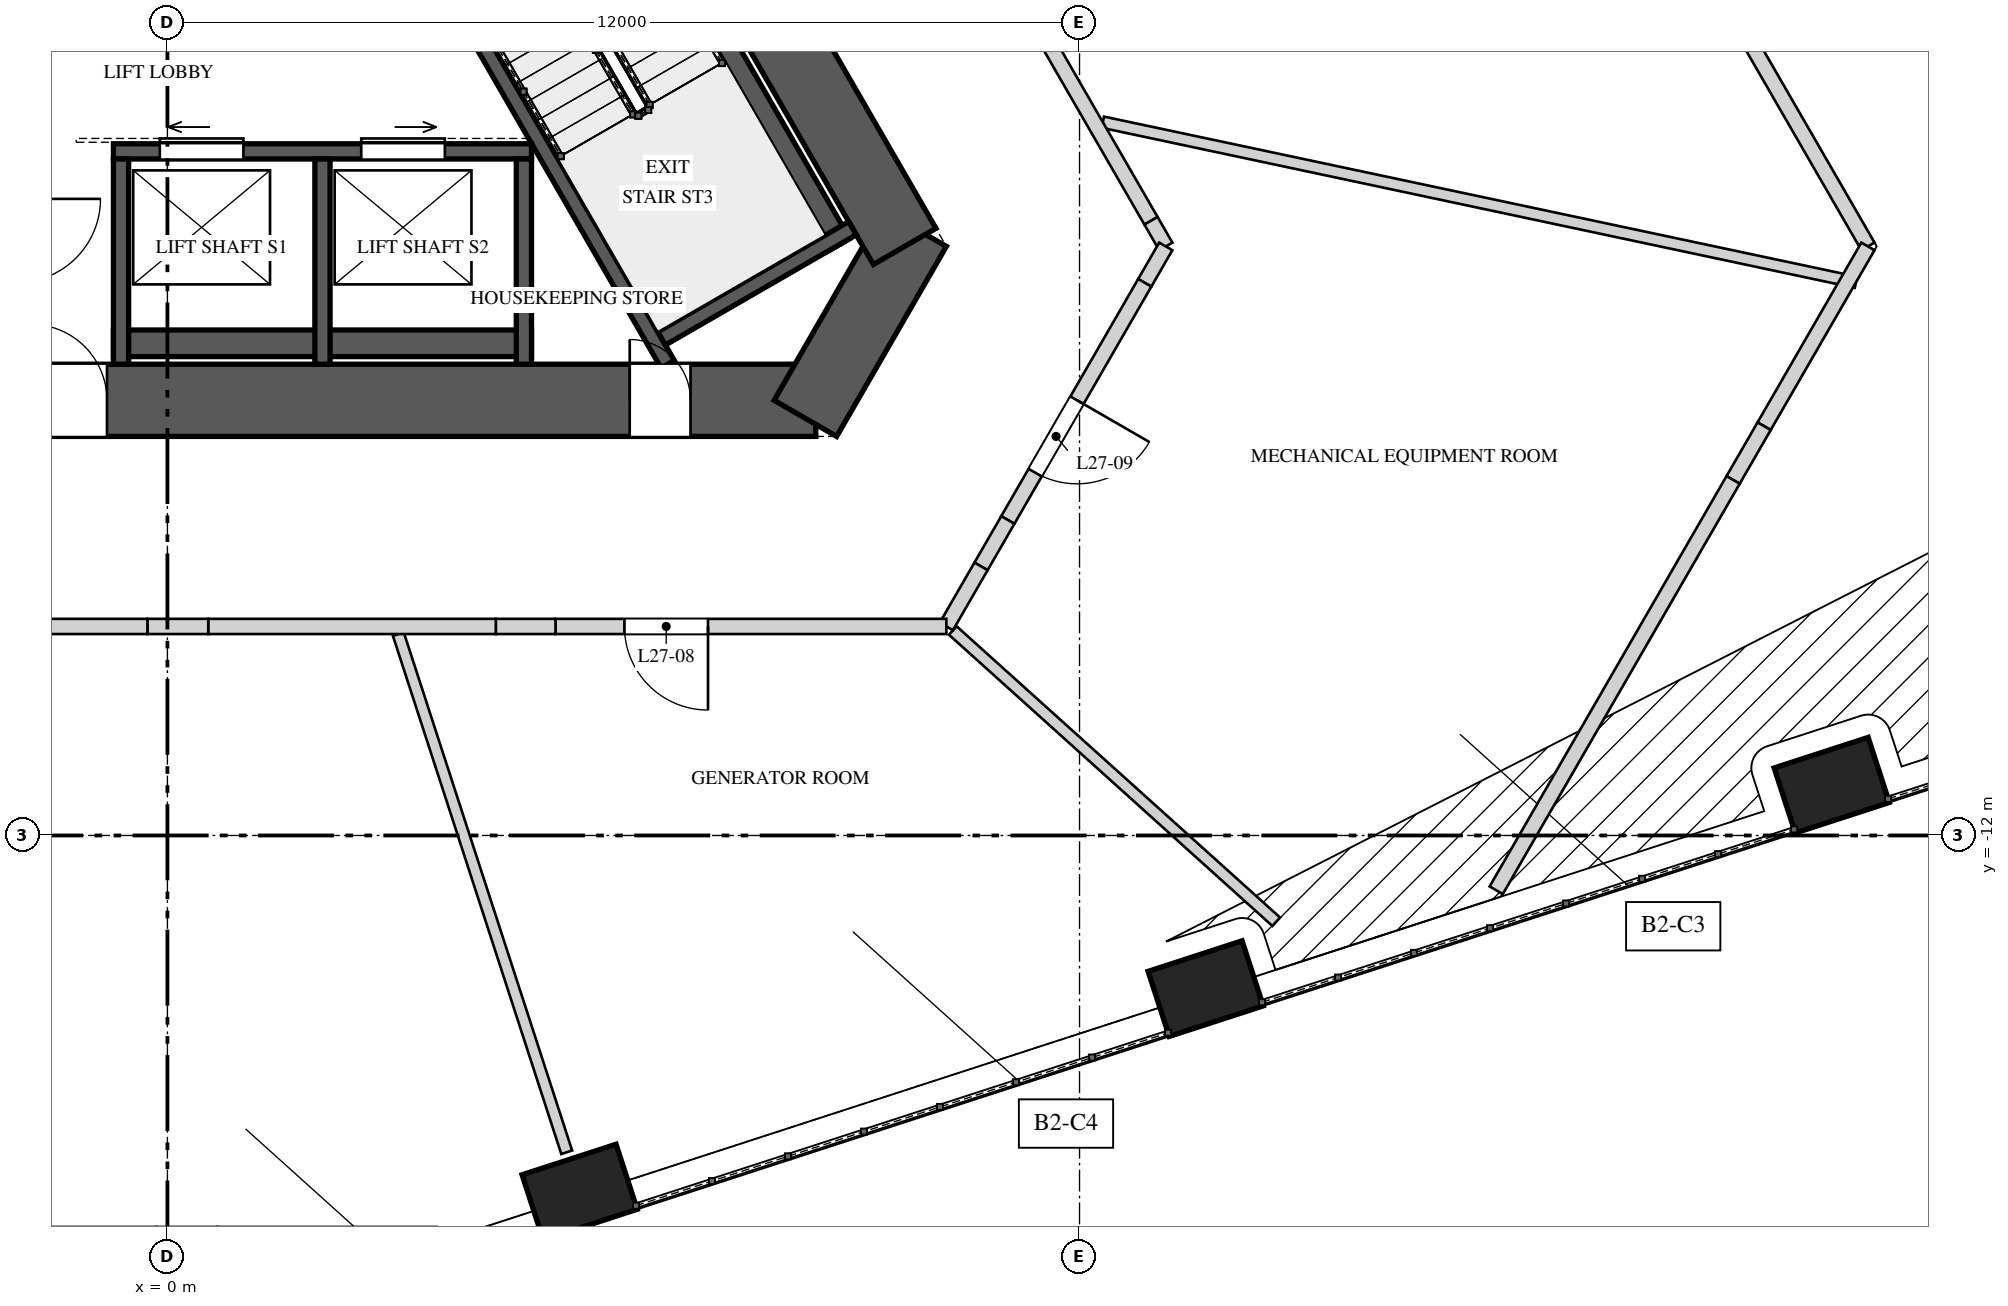
"""IFC4 building model, lengths in metres.
Left out: names, types, materials, properties, quantities, classifications, styles, units other than length and angle.
Written with IfcOpenShell. Run it as: python <this file> out.ifc"""

import sys

from ifc_helpers import new_model, si_unit, direction, frame, frame_2d, origin, origin_2d, place, context, subcontext, project, spatial, rectangle, extrude, element, fill, save


model = new_model("IFC4")
c1 = context("Model", 3, precision=1e-05, world=origin(), true_north=direction((0.0, 1.0)))
c2 = subcontext(c1, "Body", "Model", "MODEL_VIEW")
j1 = project(units=[si_unit("LENGTHUNIT", "METRE"), si_unit("PLANEANGLEUNIT", "RADIAN")], contexts=[c1])
p1 = place(None, origin())
s1 = spatial("IfcSite", under=j1, at=p1, CompositionType="ELEMENT")
p2 = place(p1, origin())
s2 = spatial("IfcBuilding", under=s1, at=p2, CompositionType="ELEMENT")
p3 = place(p2, frame((0.0, 0.0, 120.4)))
s3 = spatial("IfcBuildingStorey", under=s2, at=p3, CompositionType="ELEMENT", Elevation=120.4)
p4 = place(p3, frame((-1.169, 10.525, 0.0), z_axis=(0.0, 0.0, 1.0), x_axis=(-0.499999102847, -0.866025921755, 0.0)))
e1 = element("IfcWall", 1, at=p4, inside=s3, PredefinedType="SHEAR", context=c2, shape_type="SweptSolid", body=[
    extrude(rectangle(XDim=17.061, YDim=0.95, at=frame_2d((8.53, 0.0))), origin(), (0.0, 0.0, 1.0), 5.2),
])
p5 = place(p4, frame((6.735, 0.0, 0.0)))
e2 = element("IfcOpeningElement", 2, at=p5, cuts=e1, PredefinedType="OPENING", context=c2, shape_type="SweptSolid", body=[
    extrude(rectangle(XDim=1.0, YDim=2.4, at=frame_2d((0.5, 1.2))), frame((0.0, 0.485, 0.0), z_axis=(0.0, -1.0, 0.0), x_axis=(1.0, 0.0, 0.0)), (0.0, 0.0, 1.0), 0.97),
])
p6 = place(p3, frame((-8.531, -6.275, 0.0), z_axis=(0.0, 0.0, 1.0), x_axis=(1.0, 0.0, 0.0)))
e3 = element("IfcWall", 3, at=p6, inside=s3, PredefinedType="SHEAR", context=c2, shape_type="SweptSolid", body=[
    extrude(rectangle(XDim=17.061, YDim=0.95, at=frame_2d((8.531, 0.0))), origin(), (0.0, 0.0, 1.0), 5.2),
])
p7 = place(p6, frame((6.735, 0.0, 0.0)))
e4 = element("IfcOpeningElement", 4, at=p7, cuts=e3, PredefinedType="OPENING", context=c2, shape_type="SweptSolid", body=[
    extrude(rectangle(XDim=1.0, YDim=2.4, at=frame_2d((0.5, 1.2))), frame((0.0, 0.485, 0.0), z_axis=(0.0, -1.0, 0.0), x_axis=(1.0, 0.0, 0.0)), (0.0, 0.0, 1.0), 0.97),
])
p8 = place(p6, frame((14.613, 0.0, 0.0)))
e5 = element("IfcOpeningElement", 5, at=p8, cuts=e3, PredefinedType="OPENING", context=c2, shape_type="SweptSolid", body=[
    extrude(rectangle(XDim=0.8, YDim=2.1, at=frame_2d((0.4, 1.05))), frame((0.0, 0.485, 0.0), z_axis=(0.0, -1.0, 0.0), x_axis=(1.0, 0.0, 0.0)), (0.0, 0.0, 1.0), 0.97),
])
p9 = place(p3, frame((8.393, -6.512, 0.0), z_axis=(0.0, 0.0, 1.0), x_axis=(0.499995765644, 0.866027848477, 0.0)))
e6 = element("IfcWall", 6, at=p9, inside=s3, PredefinedType="SHEAR", context=c2, shape_type="SweptSolid", body=[
    extrude(rectangle(XDim=2.887, YDim=0.95, at=frame_2d((1.443, 0.0))), origin(), (0.0, 0.0, 1.0), 5.2),
])
p10 = place(p3, frame((9.699, -4.25, 0.0), z_axis=(0.0, 0.0, 1.0), x_axis=(-0.499999102847, 0.866025921755, 0.0)))
e7 = element("IfcWall", 7, at=p10, inside=s3, PredefinedType="SHEAR", context=c2, shape_type="SweptSolid", body=[
    extrude(rectangle(XDim=17.061, YDim=0.95, at=frame_2d((8.53, 0.0))), origin(), (0.0, 0.0, 1.0), 5.2),
])
p11 = place(p10, frame((6.805, 0.0, 0.0)))
e8 = element("IfcOpeningElement", 8, at=p11, cuts=e7, PredefinedType="OPENING", context=c2, shape_type="SweptSolid", body=[
    extrude(rectangle(XDim=1.0, YDim=2.4, at=frame_2d((0.5, 1.2))), frame((0.0, 0.485, 0.0), z_axis=(0.0, -1.0, 0.0), x_axis=(1.0, 0.0, 0.0)), (0.0, 0.0, 1.0), 0.97),
])
p12 = place(p10, frame((14.114, 0.0, 0.0)))
e9 = element("IfcOpeningElement", 9, at=p12, cuts=e7, PredefinedType="OPENING", context=c2, shape_type="SweptSolid", body=[
    extrude(rectangle(XDim=0.8, YDim=2.1, at=frame_2d((0.4, 1.05))), frame((0.0, 0.485, 0.0), z_axis=(0.0, -1.0, 0.0), x_axis=(1.0, 0.0, 0.0)), (0.0, 0.0, 1.0), 0.97),
])
for number, where, z_axis, x_axis in (
    (10, (5.423, -16.691, 0.0), (0.0, 0.0, 1.0), (0.951, 0.309, 0.0)),
    (11, (13.66, -14.015, 0.0), (0.0, 0.0, 1.0), (0.951, 0.309, 0.0)),
    (12, (21.896, -11.339, 0.0), (0.0, 0.0, 1.0), (0.951, 0.309, 0.0)),
):
    element("IfcColumn", number, at=place(p3, frame(where, z_axis=z_axis, x_axis=x_axis)), inside=s3, PredefinedType="COLUMN", context=c2, shape_type="SweptSolid", body=[
        extrude(rectangle(XDim=1.3, YDim=0.9, at=origin_2d()), origin(), (0.0, 0.0, 1.0), 2.864),
    ])
p13 = place(p3, frame((8.825, -4.235, 0.0), z_axis=(0.0, 0.0, 1.0), x_axis=(-0.499997426962, 0.866026889324, 0.0)))
e13 = element("IfcWall", 13, at=p13, inside=s3, PredefinedType="SOLIDWALL", context=c2, shape_type="SweptSolid", body=[
    extrude(rectangle(XDim=6.2, YDim=0.35, at=frame_2d((3.1, 0.0))), origin(), (0.0, 0.0, 1.0), 4.85),
])
p14 = place(p3, frame((6.582, -5.8, 0.0), z_axis=(0.0, 0.0, 1.0), x_axis=(-0.499975376872, 0.866039619487, 0.0)))
e14 = element("IfcWall", 14, at=p14, inside=s3, PredefinedType="SOLIDWALL", context=c2, shape_type="SweptSolid", body=[
    extrude(rectangle(XDim=6.434, YDim=0.2, at=frame_2d((3.217, 0.0))), origin(), (0.0, 0.0, 1.0), 4.85),
])
p15 = place(p3, frame((6.501, -5.461, 0.0), z_axis=(0.0, 0.0, 1.0), x_axis=(0.866032775405, 0.499987231761, 0.0)))
e15 = element("IfcWall", 15, at=p15, inside=s3, PredefinedType="SOLIDWALL", context=c2, shape_type="SweptSolid", body=[
    extrude(rectangle(XDim=2.9, YDim=0.2, at=frame_2d((1.45, 0.0))), origin(), (0.0, 0.0, 1.0), 4.85),
])
p16 = place(p3, frame((-0.71, -3.0, 0.0), z_axis=(0.0, 0.0, 1.0), x_axis=(1.0, 0.0, 0.0)))
e16 = element("IfcWall", 16, at=p16, inside=s3, PredefinedType="SOLIDWALL", context=c2, shape_type="SweptSolid", body=[
    extrude(rectangle(XDim=5.5, YDim=0.2, at=frame_2d((2.75, 0.0))), origin(), (0.0, 0.0, 1.0), 4.85),
])
p17 = place(p16, frame((0.61, 0.0, 0.0)))
e17 = element("IfcOpeningElement", 17, at=p17, cuts=e16, PredefinedType="OPENING", context=c2, shape_type="SweptSolid", body=[
    extrude(rectangle(XDim=1.1, YDim=2.1, at=frame_2d((0.55, 1.05))), frame((0.0, 0.11, 0.0), z_axis=(0.0, -1.0, 0.0), x_axis=(1.0, 0.0, 0.0)), (0.0, 0.0, 1.0), 0.22),
])
p18 = place(p16, frame((3.26, 0.0, 0.0)))
e18 = element("IfcOpeningElement", 18, at=p18, cuts=e16, PredefinedType="OPENING", context=c2, shape_type="SweptSolid", body=[
    extrude(rectangle(XDim=1.1, YDim=2.1, at=frame_2d((0.55, 1.05))), frame((0.0, 0.11, 0.0), z_axis=(0.0, -1.0, 0.0), x_axis=(1.0, 0.0, 0.0)), (0.0, 0.0, 1.0), 0.22),
])
p19 = place(p3, frame((-0.71, -5.525, 0.0), z_axis=(0.0, 0.0, 1.0), x_axis=(1.0, 0.0, 0.0)))
e19 = element("IfcWall", 19, at=p19, inside=s3, PredefinedType="SOLIDWALL", context=c2, shape_type="SweptSolid", body=[
    extrude(rectangle(XDim=5.5, YDim=0.35, at=frame_2d((2.75, 0.0))), origin(), (0.0, 0.0, 1.0), 4.85),
])
for number, where, z_axis, x_axis in (
    (20, (-0.61, -3.1, 0.0), (0.0, 0.0, 1.0), (0.0, -1.0, 0.0)),
    (21, (2.04, -3.1, 0.0), (0.0, 0.0, 1.0), (0.0, -1.0, 0.0)),
    (22, (4.69, -3.1, 0.0), (0.0, 0.0, 1.0), (0.0, -1.0, 0.0)),
):
    element("IfcWall", number, at=place(p3, frame(where, z_axis=z_axis, x_axis=x_axis)), inside=s3, PredefinedType="SOLIDWALL", context=c2, shape_type="SweptSolid", body=[
        extrude(rectangle(XDim=2.7, YDim=0.2, at=frame_2d((1.35, 0.0))), origin(), (0.0, 0.0, 1.0), 4.85),
    ])
p20 = place(p3, frame((3.038, -9.35, 0.0), z_axis=(0.0, 0.0, 1.0), x_axis=(0.308995202085, -0.951063596763, 0.0)))
e23 = element("IfcWall", 23, at=p20, inside=s3, PredefinedType="PARTITIONING", context=c2, shape_type="SweptSolid", body=[
    extrude(rectangle(XDim=7.169, YDim=0.15, at=frame_2d((3.584, 0.0))), origin(), (0.0, 0.0, 1.0), 4.85),
])
p21 = place(p3, frame((10.333, -9.303, 0.0), z_axis=(0.0, 0.0, 1.0), x_axis=(0.743145726362, -0.669129605824, 0.0)))
e24 = element("IfcWall", 24, at=p21, inside=s3, PredefinedType="PARTITIONING", context=c2, shape_type="SweptSolid", body=[
    extrude(rectangle(XDim=5.726, YDim=0.15, at=frame_2d((2.863, 0.0))), origin(), (0.0, 0.0, 1.0), 4.85),
])
p22 = place(p3, frame((22.215, -4.722, 0.0), z_axis=(0.0, 0.0, 1.0), x_axis=(-0.978151622634, 0.207892768365, 0.0)))
e25 = element("IfcWall", 25, at=p22, inside=s3, PredefinedType="PARTITIONING", context=c2, shape_type="SweptSolid", body=[
    extrude(rectangle(XDim=10.13, YDim=0.15, at=frame_2d((5.065, 0.0))), origin(), (0.0, 0.0, 1.0), 4.85),
])
p23 = place(p3, frame((9.703, 1.694, 0.0), z_axis=(0.0, 0.0, 1.0), x_axis=(0.500004272639, -0.866022936961, 0.0)))
e26 = element("IfcWall", 26, at=p23, inside=s3, PredefinedType="SOLIDWALL", context=c2, shape_type="SweptSolid", body=[
    extrude(rectangle(XDim=6.474, YDim=0.2, at=frame_2d((3.237, 0.0))), origin(), (0.0, 0.0, 1.0), 4.85),
])
p24 = place(p23, frame((1.269, 0.0, 0.0)))
e27 = element("IfcOpeningElement", 27, at=p24, cuts=e26, PredefinedType="OPENING", context=c2, shape_type="SweptSolid", body=[
    extrude(rectangle(XDim=1.1, YDim=2.2, at=frame_2d((0.55, 1.1))), frame((0.0, 0.11, 0.0), z_axis=(0.0, -1.0, 0.0), x_axis=(1.0, 0.0, 0.0)), (0.0, 0.0, 1.0), 0.22),
])
p25 = place(p3, frame((12.94, -3.913, 0.0), z_axis=(0.0, 0.0, 1.0), x_axis=(0.499849133735, -0.866112488944, 0.0)))
e28 = element("IfcWall", 28, at=p25, inside=s3, PredefinedType="SOLIDWALL", context=c2, shape_type="SweptSolid", body=[
    extrude(rectangle(XDim=0.389, YDim=0.2, at=frame_2d((0.195, 0.0))), origin(), (0.0, 0.0, 1.0), 3.95),
])
p26 = place(p3, frame((13.135, -4.25, 0.0), z_axis=(0.0, 0.0, 1.0), x_axis=(-0.499887958344, -0.866090081402, 0.0)))
e29 = element("IfcWall", 29, at=p26, inside=s3, PredefinedType="SOLIDWALL", context=c2, shape_type="SweptSolid", body=[
    extrude(rectangle(XDim=0.553, YDim=0.2, at=frame_2d((0.277, 0.0))), origin(), (0.0, 0.0, 1.0), 3.95),
])
p27 = place(p3, frame((12.858, -4.729, 0.0), z_axis=(0.0, 0.0, 1.0), x_axis=(-0.500031425827, -0.866007259314, 0.0)))
e30 = element("IfcWall", 30, at=p27, inside=s3, PredefinedType="SOLIDWALL", context=c2, shape_type="SweptSolid", body=[
    extrude(rectangle(XDim=3.602, YDim=0.2, at=frame_2d((1.801, 0.0))), origin(), (0.0, 0.0, 1.0), 4.85),
])
p28 = place(p27, frame((1.783, 0.0, 0.0)))
e31 = element("IfcOpeningElement", 31, at=p28, cuts=e30, PredefinedType="OPENING", context=c2, shape_type="SweptSolid", body=[
    extrude(rectangle(XDim=1.1, YDim=2.2, at=frame_2d((0.55, 1.1))), frame((0.0, 0.11, 0.0), z_axis=(0.0, -1.0, 0.0), x_axis=(1.0, 0.0, 0.0)), (0.0, 0.0, 1.0), 0.22),
])
p29 = place(p3, frame((11.057, -7.849, 0.0), z_axis=(0.0, 0.0, 1.0), x_axis=(-0.500012199891, -0.86601836006, 0.0)))
e32 = element("IfcWall", 32, at=p29, inside=s3, PredefinedType="SOLIDWALL", context=c2, shape_type="SweptSolid", body=[
    extrude(rectangle(XDim=0.705, YDim=0.2, at=frame_2d((0.353, 0.0))), origin(), (0.0, 0.0, 1.0), 4.15),
])
p30 = place(p3, frame((10.704, -8.459, 0.0), z_axis=(0.0, 0.0, 1.0), x_axis=(-0.499907684424, -0.866078695647, 0.0)))
e33 = element("IfcWall", 33, at=p30, inside=s3, PredefinedType="SOLIDWALL", context=c2, shape_type="SweptSolid", body=[
    extrude(rectangle(XDim=0.913, YDim=0.2, at=frame_2d((0.457, 0.0))), origin(), (0.0, 0.0, 1.0), 4.85),
])
p31 = place(p3, frame((10.248, -9.25, 0.0), z_axis=(0.0, 0.0, 1.0), x_axis=(-1.0, 0.0, 0.0)))
e34 = element("IfcWall", 34, at=p31, inside=s3, PredefinedType="SOLIDWALL", context=c2, shape_type="SweptSolid", body=[
    extrude(rectangle(XDim=5.142, YDim=0.2, at=frame_2d((2.571, 0.0))), origin(), (0.0, 0.0, 1.0), 4.85),
])
p32 = place(p31, frame((3.136, 0.0, 0.0)))
e35 = element("IfcOpeningElement", 35, at=p32, cuts=e34, PredefinedType="OPENING", context=c2, shape_type="SweptSolid", body=[
    extrude(rectangle(XDim=1.1, YDim=2.2, at=frame_2d((0.55, 1.1))), frame((0.0, 0.11, 0.0), z_axis=(0.0, -1.0, 0.0), x_axis=(1.0, 0.0, 0.0)), (0.0, 0.0, 1.0), 0.22),
])
p33 = place(p3, frame((5.106, -9.25, 0.0), z_axis=(0.0, 0.0, 1.0), x_axis=(-1.0, 0.0, 0.0)))
e36 = element("IfcWall", 36, at=p33, inside=s3, PredefinedType="SOLIDWALL", context=c2, shape_type="SweptSolid", body=[
    extrude(rectangle(XDim=0.786, YDim=0.2, at=frame_2d((0.393, 0.0))), origin(), (0.0, 0.0, 1.0), 4.15),
])
p34 = place(p3, frame((4.32, -9.25, 0.0), z_axis=(0.0, 0.0, 1.0), x_axis=(-1.0, 0.0, 0.0)))
e37 = element("IfcWall", 37, at=p34, inside=s3, PredefinedType="SOLIDWALL", context=c2, shape_type="SweptSolid", body=[
    extrude(rectangle(XDim=3.783, YDim=0.2, at=frame_2d((1.892, 0.0))), origin(), (0.0, 0.0, 1.0), 4.85),
])
p35 = place(p3, frame((0.537, -9.25, 0.0), z_axis=(0.0, 0.0, 1.0), x_axis=(-1.0, 0.0, 0.0)))
e38 = element("IfcWall", 38, at=p35, inside=s3, PredefinedType="SOLIDWALL", context=c2, shape_type="SweptSolid", body=[
    extrude(rectangle(XDim=0.8, YDim=0.2, at=frame_2d((0.4, 0.0))), origin(), (0.0, 0.0, 1.0), 3.95),
])
p36 = place(p3, frame((-0.263, -9.25, 0.0), z_axis=(0.0, 0.0, 1.0), x_axis=(-1.0, 0.0, 0.0)))
e39 = element("IfcWall", 39, at=p36, inside=s3, PredefinedType="SOLIDWALL", context=c2, shape_type="SweptSolid", body=[
    extrude(rectangle(XDim=1.828, YDim=0.2, at=frame_2d((0.914, 0.0))), origin(), (0.0, 0.0, 1.0), 4.85),
])
p37 = place(p3, frame((17.891, 3.512, 0.0), z_axis=(0.0, 0.0, 1.0), x_axis=(0.500006187924, -0.866021831155, 0.0)))
e40 = element("IfcWall", 40, at=p37, inside=s3, PredefinedType="SOLIDWALL", context=c2, shape_type="SweptSolid", body=[
    extrude(rectangle(XDim=8.963, YDim=0.2, at=frame_2d((4.481, 0.0))), origin(), (0.0, 0.0, 1.0), 4.85),
])
p38 = place(p3, frame((22.372, -4.25, 0.0), z_axis=(0.0, 0.0, 1.0), x_axis=(-0.499975232926, -0.866039702589, 0.0)))
e41 = element("IfcWall", 41, at=p38, inside=s3, PredefinedType="SOLIDWALL", context=c2, shape_type="SweptSolid", body=[
    extrude(rectangle(XDim=2.731, YDim=0.2, at=frame_2d((1.366, 0.0))), origin(), (0.0, 0.0, 1.0), 4.85),
])
p39 = place(p3, frame((21.007, -6.615, 0.0), z_axis=(0.0, 0.0, 1.0), x_axis=(-0.500128085955, -0.865951440693, 0.0)))
e42 = element("IfcWall", 42, at=p39, inside=s3, PredefinedType="SOLIDWALL", context=c2, shape_type="SweptSolid", body=[
    extrude(rectangle(XDim=0.816, YDim=0.2, at=frame_2d((0.408, 0.0))), origin(), (0.0, 0.0, 1.0), 3.95),
])
p40 = place(p3, frame((20.599, -7.322, 0.0), z_axis=(0.0, 0.0, 1.0), x_axis=(-0.499989156383, -0.866031664259, 0.0)))
e43 = element("IfcWall", 43, at=p40, inside=s3, PredefinedType="SOLIDWALL", context=c2, shape_type="SweptSolid", body=[
    extrude(rectangle(XDim=6.234, YDim=0.2, at=frame_2d((3.117, 0.0))), origin(), (0.0, 0.0, 1.0), 4.85),
])
p41 = place(p17, origin())
e44 = element("IfcDoor", 44, at=p41, inside=s3, OperationType="SLIDING_TO_LEFT", PredefinedType="DOOR", context=c2, shape_type="SweptSolid", body=[
    extrude(rectangle(XDim=1.1, YDim=2.1, at=frame_2d((0.55, 1.05))), frame((0.0, 0.025, 0.0), z_axis=(0.0, -1.0, 0.0), x_axis=(1.0, 0.0, 0.0)), (0.0, 0.0, 1.0), 0.05),
])
fill(e17, e44)
p42 = place(p18, origin())
e45 = element("IfcDoor", 45, at=p42, inside=s3, OperationType="SLIDING_TO_RIGHT", PredefinedType="DOOR", context=c2, shape_type="SweptSolid", body=[
    extrude(rectangle(XDim=1.1, YDim=2.1, at=frame_2d((0.55, 1.05))), frame((0.0, 0.025, 0.0), z_axis=(0.0, -1.0, 0.0), x_axis=(1.0, 0.0, 0.0)), (0.0, 0.0, 1.0), 0.05),
])
fill(e18, e45)
p43 = place(p7, origin())
e46 = element("IfcDoor", 46, at=p43, inside=s3, OperationType="SINGLE_SWING_LEFT", PredefinedType="DOOR", context=c2, shape_type="SweptSolid", body=[
    extrude(rectangle(XDim=1.0, YDim=2.4, at=frame_2d((0.5, 1.2))), frame((0.0, 0.025, 0.0), z_axis=(0.0, -1.0, 0.0), x_axis=(1.0, 0.0, 0.0)), (0.0, 0.0, 1.0), 0.05),
])
fill(e4, e46)
p44 = place(p8, origin())
e47 = element("IfcDoor", 47, at=p44, inside=s3, OperationType="SINGLE_SWING_LEFT", PredefinedType="DOOR", context=c2, shape_type="SweptSolid", body=[
    extrude(rectangle(XDim=0.8, YDim=2.1, at=frame_2d((0.4, 1.05))), frame((0.0, 0.025, 0.0), z_axis=(0.0, -1.0, 0.0), x_axis=(1.0, 0.0, 0.0)), (0.0, 0.0, 1.0), 0.05),
])
fill(e5, e47)
p45 = place(p32, origin())
e48 = element("IfcDoor", 48, at=p45, inside=s3, OperationType="SINGLE_SWING_RIGHT", PredefinedType="DOOR", context=c2, shape_type="SweptSolid", body=[
    extrude(rectangle(XDim=1.1, YDim=2.2, at=frame_2d((0.55, 1.1))), frame((0.0, 0.025, 0.0), z_axis=(0.0, -1.0, 0.0), x_axis=(1.0, 0.0, 0.0)), (0.0, 0.0, 1.0), 0.05),
])
fill(e35, e48)
p46 = place(p28, origin())
e49 = element("IfcDoor", 49, at=p46, inside=s3, OperationType="SINGLE_SWING_LEFT", PredefinedType="DOOR", context=c2, shape_type="SweptSolid", body=[
    extrude(rectangle(XDim=1.1, YDim=2.2, at=frame_2d((0.55, 1.1))), frame((0.0, 0.025, 0.0), z_axis=(0.0, -1.0, 0.0), x_axis=(1.0, 0.0, 0.0)), (0.0, 0.0, 1.0), 0.05),
])
fill(e31, e49)
save(model, sys.argv[1])
